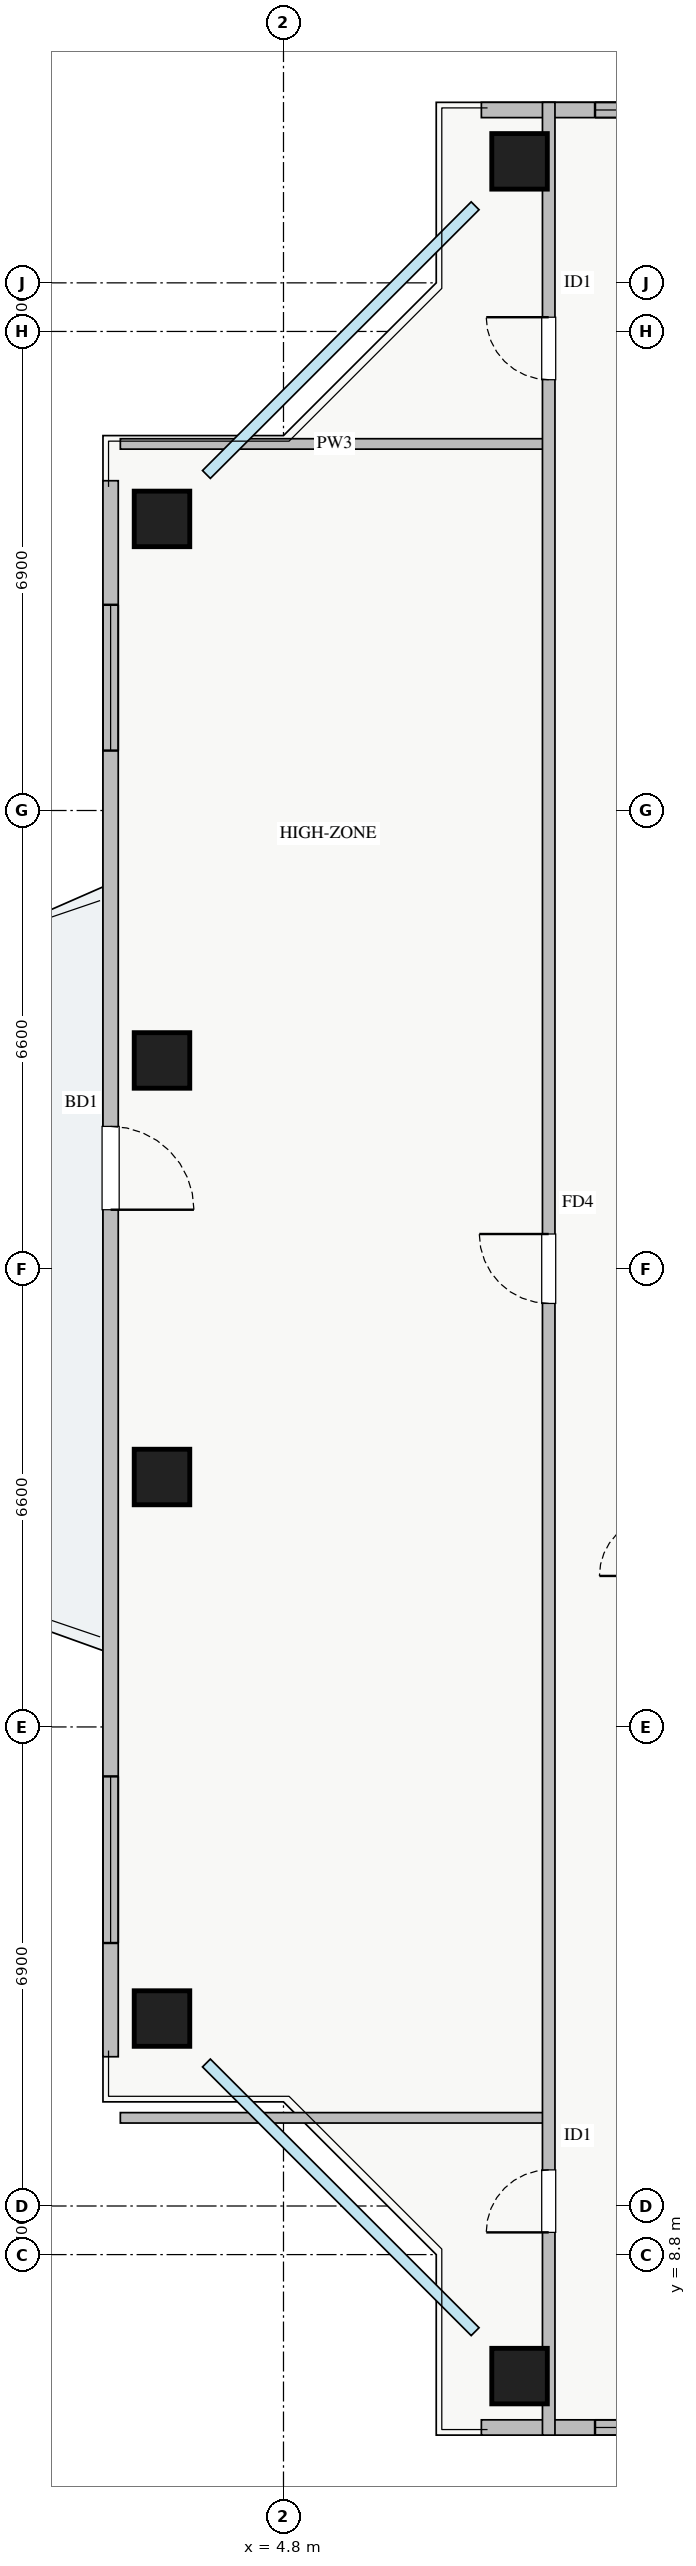
"""IFC4 building model, lengths in metres.
Left out: names, types, materials, properties, quantities, classifications, styles, units other than length and angle.
Written with IfcOpenShell. Run it as: python <this file> out.ifc"""

import sys

from ifc_helpers import new_model, si_unit, direction, frame, frame_2d, origin, origin_2d, place, context, subcontext, project, spatial, rectangle, extrude, source, transform, mapped, element, fill, save


model = new_model("IFC4")
c1 = context("Model", 3, precision=1e-05, world=origin(), true_north=direction((0.0, 1.0)))
c2 = subcontext(c1, "Body", "Model", "MODEL_VIEW")
j1 = project(units=[si_unit("LENGTHUNIT", "METRE"), si_unit("PLANEANGLEUNIT", "RADIAN")], contexts=[c1])
p1 = place(None, origin())
s1 = spatial("IfcSite", under=j1, at=p1, CompositionType="ELEMENT")
p2 = place(p1, origin())
s2 = spatial("IfcBuilding", under=s1, at=p2, CompositionType="ELEMENT")
p3 = place(p2, frame((0.0, 0.0, 229.5)))
s3 = spatial("IfcBuildingStorey", under=s2, at=p3, CompositionType="ELEMENT", Elevation=229.5)
m1 = source(origin(), c2, "Body", "SweptSolid", [
    extrude(rectangle(XDim=0.8, YDim=0.8, at=origin_2d()), origin(), (0.0, 0.0, 1.0), 3.25),
])
for number, where, z_axis, x_axis in (
    (1, (8.2, 7.05, 0.0), (0.0, 0.0, 1.0), (1.0, 0.0, 0.0)),
    (2, (8.2, 38.95, 0.0), (0.0, 0.0, 1.0), (1.0, 0.0, 0.0)),
    (3, (3.05, 33.8, 0.0), (0.0, 0.0, 1.0), (1.0, 0.0, 0.0)),
    (4, (3.05, 26.0, 0.0), (0.0, 0.0, 1.0), (1.0, 0.0, 0.0)),
    (5, (3.05, 20.0, 0.0), (0.0, 0.0, 1.0), (1.0, 0.0, 0.0)),
    (6, (3.05, 12.2, 0.0), (0.0, 0.0, 1.0), (1.0, 0.0, 0.0)),
):
    element("IfcColumn", number, at=place(p3, frame(where, z_axis=z_axis, x_axis=x_axis)), inside=s3, PredefinedType="COLUMN", context=c2, shape_type="MappedRepresentation", body=[
        mapped(m1, transform((0.0, 0.0, 0.0), x_axis=(1.0, 0.0, 0.0), y_axis=(0.0, 1.0, 0.0), z_axis=(0.0, 0.0, 1.0), scale=1.0)),
    ])
p4 = place(p3, frame((7.65, 6.31, 0.0), z_axis=(0.0, 0.0, 1.0), x_axis=(1.0, 0.0, 0.0)))
e7 = element("IfcWall", 7, at=p4, inside=s3, PredefinedType="STANDARD", context=c2, shape_type="SweptSolid", body=[
    extrude(rectangle(XDim=22.7, YDim=0.22, at=frame_2d((11.35, 0.0))), origin(), (0.0, 0.0, 1.0), 2.57),
])
p5 = place(p4, frame((12.2, 0.0, 0.0)))
e8 = element("IfcOpeningElement", 8, at=p5, cuts=e7, PredefinedType="OPENING", context=c2, shape_type="SweptSolid", body=[
    extrude(rectangle(XDim=1.2, YDim=2.1, at=frame_2d((0.6, 1.05))), frame((0.0, 0.12, 0.0), z_axis=(0.0, -1.0, 0.0), x_axis=(1.0, 0.0, 0.0)), (0.0, 0.0, 1.0), 0.24),
])
p6 = place(p4, frame((1.637, 0.0, 0.9)))
e9 = element("IfcOpeningElement", 9, at=p6, cuts=e7, PredefinedType="OPENING", context=c2, shape_type="SweptSolid", body=[
    extrude(rectangle(XDim=2.4, YDim=1.48, at=frame_2d((1.2, 0.74))), frame((0.0, 0.12, 0.0), z_axis=(0.0, -1.0, 0.0), x_axis=(1.0, 0.0, 0.0)), (0.0, 0.0, 1.0), 0.24),
])
p7 = place(p4, frame((7.612, 0.0, 0.9)))
e10 = element("IfcOpeningElement", 10, at=p7, cuts=e7, PredefinedType="OPENING", context=c2, shape_type="SweptSolid", body=[
    extrude(rectangle(XDim=1.8, YDim=1.45, at=frame_2d((0.9, 0.725))), frame((0.0, 0.12, 0.0), z_axis=(0.0, -1.0, 0.0), x_axis=(1.0, 0.0, 0.0)), (0.0, 0.0, 1.0), 0.24),
])
p8 = place(p4, frame((20.238, 0.0, 0.9)))
e11 = element("IfcOpeningElement", 11, at=p8, cuts=e7, PredefinedType="OPENING", context=c2, shape_type="SweptSolid", body=[
    extrude(rectangle(XDim=2.1, YDim=1.5, at=frame_2d((1.05, 0.75))), frame((0.0, 0.12, 0.0), z_axis=(0.0, -1.0, 0.0), x_axis=(1.0, 0.0, 0.0)), (0.0, 0.0, 1.0), 0.24),
])
p9 = place(p4, frame((17.02, 0.0, 0.9)))
e12 = element("IfcOpeningElement", 12, at=p9, cuts=e7, PredefinedType="OPENING", context=c2, shape_type="SweptSolid", body=[
    extrude(rectangle(XDim=2.4, YDim=1.5, at=frame_2d((1.2, 0.75))), frame((0.0, 0.12, 0.0), z_axis=(0.0, -1.0, 0.0), x_axis=(1.0, 0.0, 0.0)), (0.0, 0.0, 1.0), 0.24),
])
p10 = place(p3, frame((7.65, 39.69, 0.0), z_axis=(0.0, 0.0, 1.0), x_axis=(1.0, 0.0, 0.0)))
e13 = element("IfcWall", 13, at=p10, inside=s3, PredefinedType="STANDARD", context=c2, shape_type="SweptSolid", body=[
    extrude(rectangle(XDim=22.7, YDim=0.22, at=frame_2d((11.35, 0.0))), origin(), (0.0, 0.0, 1.0), 2.57),
])
p11 = place(p10, frame((12.2, 0.0, 0.0)))
e14 = element("IfcOpeningElement", 14, at=p11, cuts=e13, PredefinedType="OPENING", context=c2, shape_type="SweptSolid", body=[
    extrude(rectangle(XDim=1.2, YDim=2.1, at=frame_2d((0.6, 1.05))), frame((0.0, 0.12, 0.0), z_axis=(0.0, -1.0, 0.0), x_axis=(1.0, 0.0, 0.0)), (0.0, 0.0, 1.0), 0.24),
])
p12 = place(p10, frame((1.637, 0.0, 0.9)))
e15 = element("IfcOpeningElement", 15, at=p12, cuts=e13, PredefinedType="OPENING", context=c2, shape_type="SweptSolid", body=[
    extrude(rectangle(XDim=2.4, YDim=1.48, at=frame_2d((1.2, 0.74))), frame((0.0, 0.12, 0.0), z_axis=(0.0, -1.0, 0.0), x_axis=(1.0, 0.0, 0.0)), (0.0, 0.0, 1.0), 0.24),
])
p13 = place(p10, frame((7.612, 0.0, 0.9)))
e16 = element("IfcOpeningElement", 16, at=p13, cuts=e13, PredefinedType="OPENING", context=c2, shape_type="SweptSolid", body=[
    extrude(rectangle(XDim=1.8, YDim=1.45, at=frame_2d((0.9, 0.725))), frame((0.0, 0.12, 0.0), z_axis=(0.0, -1.0, 0.0), x_axis=(1.0, 0.0, 0.0)), (0.0, 0.0, 1.0), 0.24),
])
p14 = place(p10, frame((18.812, 0.0, 0.9)))
e17 = element("IfcOpeningElement", 17, at=p14, cuts=e13, PredefinedType="OPENING", context=c2, shape_type="SweptSolid", body=[
    extrude(rectangle(XDim=2.1, YDim=1.48, at=frame_2d((1.05, 0.74))), frame((0.0, 0.12, 0.0), z_axis=(0.0, -1.0, 0.0), x_axis=(1.0, 0.0, 0.0)), (0.0, 0.0, 1.0), 0.24),
])
p15 = place(p3, frame((2.31, 11.65, 0.0), z_axis=(0.0, 0.0, 1.0), x_axis=(0.0, 1.0, 0.0)))
e18 = element("IfcWall", 18, at=p15, inside=s3, PredefinedType="STANDARD", context=c2, shape_type="SweptSolid", body=[
    extrude(rectangle(XDim=22.7, YDim=0.22, at=frame_2d((11.35, 0.0))), origin(), (0.0, 0.0, 1.0), 2.57),
])
p16 = place(p15, frame((12.2, 0.0, 0.0)))
e19 = element("IfcOpeningElement", 19, at=p16, cuts=e18, PredefinedType="OPENING", context=c2, shape_type="SweptSolid", body=[
    extrude(rectangle(XDim=1.2, YDim=2.1, at=frame_2d((0.6, 1.05))), frame((0.0, 0.12, 0.0), z_axis=(0.0, -1.0, 0.0), x_axis=(1.0, 0.0, 0.0)), (0.0, 0.0, 1.0), 0.24),
])
p17 = place(p15, frame((1.638, 0.0, 0.9)))
e20 = element("IfcOpeningElement", 20, at=p17, cuts=e18, PredefinedType="OPENING", context=c2, shape_type="SweptSolid", body=[
    extrude(rectangle(XDim=2.4, YDim=1.48, at=frame_2d((1.2, 0.74))), frame((0.0, 0.12, 0.0), z_axis=(0.0, -1.0, 0.0), x_axis=(1.0, 0.0, 0.0)), (0.0, 0.0, 1.0), 0.24),
])
p18 = place(p15, frame((18.813, 0.0, 0.9)))
e21 = element("IfcOpeningElement", 21, at=p18, cuts=e18, PredefinedType="OPENING", context=c2, shape_type="SweptSolid", body=[
    extrude(rectangle(XDim=2.1, YDim=1.48, at=frame_2d((1.05, 0.74))), frame((0.0, 0.12, 0.0), z_axis=(0.0, -1.0, 0.0), x_axis=(1.0, 0.0, 0.0)), (0.0, 0.0, 1.0), 0.24),
])
for number, where, z_axis, x_axis in (
    (22, (2.45, 34.88, 0.0), (0.0, 0.0, 1.0), (1.0, 0.0, 0.0)),
    (23, (2.45, 10.77, 0.0), (0.0, 0.0, 1.0), (1.0, 0.0, 0.0)),
):
    element("IfcWall", number, at=place(p3, frame(where, z_axis=z_axis, x_axis=x_axis)), inside=s3, PredefinedType="PARTITIONING", context=c2, shape_type="SweptSolid", body=[
        extrude(rectangle(XDim=6.17, YDim=0.15, at=frame_2d((3.085, 0.0))), origin(), (0.0, 0.0, 1.0), 3.03),
    ])
p19 = place(p3, frame((8.62, 6.2, 0.0), z_axis=(0.0, 0.0, 1.0), x_axis=(0.0, 1.0, 0.0)))
e24 = element("IfcWall", 24, at=p19, inside=s3, PredefinedType="PARTITIONING", context=c2, shape_type="SweptSolid", body=[
    extrude(rectangle(XDim=33.6, YDim=0.18, at=frame_2d((16.8, 0.0))), origin(), (0.0, 0.0, 1.0), 3.03),
])
p20 = place(p19, frame((29.605, 0.0, 0.0)))
e25 = element("IfcOpeningElement", 25, at=p20, cuts=e24, PredefinedType="OPENING", context=c2, shape_type="SweptSolid", body=[
    extrude(rectangle(XDim=0.9, YDim=2.05, at=frame_2d((0.45, 1.025))), frame((0.0, 0.1, 0.0), z_axis=(0.0, -1.0, 0.0), x_axis=(1.0, 0.0, 0.0)), (0.0, 0.0, 1.0), 0.2),
])
p21 = place(p19, frame((2.92, 0.0, 0.0)))
e26 = element("IfcOpeningElement", 26, at=p21, cuts=e24, PredefinedType="OPENING", context=c2, shape_type="SweptSolid", body=[
    extrude(rectangle(XDim=0.9, YDim=2.05, at=frame_2d((0.45, 1.025))), frame((0.0, 0.1, 0.0), z_axis=(0.0, -1.0, 0.0), x_axis=(1.0, 0.0, 0.0)), (0.0, 0.0, 1.0), 0.2),
])
p22 = place(p19, frame((16.3, 0.0, 0.0)))
e27 = element("IfcOpeningElement", 27, at=p22, cuts=e24, PredefinedType="OPENING", context=c2, shape_type="SweptSolid", body=[
    extrude(rectangle(XDim=1.0, YDim=2.05, at=frame_2d((0.5, 1.025))), frame((0.0, 0.1, 0.0), z_axis=(0.0, -1.0, 0.0), x_axis=(1.0, 0.0, 0.0)), (0.0, 0.0, 1.0), 0.2),
])
m2 = source(origin(), c2, "Body", "SweptSolid", [
    extrude(rectangle(XDim=2.4, YDim=1.48, at=frame_2d((1.2, 0.74))), frame((0.0, 0.03, 0.0), z_axis=(0.0, -1.0, 0.0), x_axis=(1.0, 0.0, 0.0)), (0.0, 0.0, 1.0), 0.06),
])
p23 = place(p6, origin())
e28 = element("IfcWindow", 28, at=p23, inside=s3, PartitioningType="TRIPLE_PANEL_VERTICAL", PredefinedType="WINDOW", context=c2, shape_type="MappedRepresentation", body=[
    mapped(m2, transform((0.0, 0.0, 0.0), x_axis=(1.0, 0.0, 0.0), y_axis=(0.0, 1.0, 0.0), z_axis=(0.0, 0.0, 1.0), scale=1.0)),
])
fill(e9, e28)
p24 = place(p12, origin())
e29 = element("IfcWindow", 29, at=p24, inside=s3, PartitioningType="TRIPLE_PANEL_VERTICAL", PredefinedType="WINDOW", context=c2, shape_type="MappedRepresentation", body=[
    mapped(m2, transform((0.0, 0.0, 0.0), x_axis=(1.0, 0.0, 0.0), y_axis=(0.0, 1.0, 0.0), z_axis=(0.0, 0.0, 1.0), scale=1.0)),
])
fill(e15, e29)
m3 = source(origin(), c2, "Body", "SweptSolid", [
    extrude(rectangle(XDim=1.2, YDim=2.1, at=frame_2d((0.6, 1.05))), frame((0.0, 0.025, 0.0), z_axis=(0.0, -1.0, 0.0), x_axis=(1.0, 0.0, 0.0)), (0.0, 0.0, 1.0), 0.05),
])
p25 = place(p16, frame((1.2, 0.0, 0.0), z_axis=(0.0, 0.0, 1.0), x_axis=(-1.0, 0.0, 0.0)))
e30 = element("IfcDoor", 30, at=p25, inside=s3, OperationType="SINGLE_SWING_LEFT", PredefinedType="DOOR", context=c2, shape_type="MappedRepresentation", body=[
    mapped(m3, transform((0.0, 0.0, 0.0), x_axis=(1.0, 0.0, 0.0), y_axis=(0.0, 1.0, 0.0), z_axis=(0.0, 0.0, 1.0), scale=1.0)),
])
fill(e19, e30)
p26 = place(p17, origin())
e31 = element("IfcWindow", 31, at=p26, inside=s3, PartitioningType="TRIPLE_PANEL_VERTICAL", PredefinedType="WINDOW", context=c2, shape_type="MappedRepresentation", body=[
    mapped(m2, transform((0.0, 0.0, 0.0), x_axis=(1.0, 0.0, 0.0), y_axis=(0.0, 1.0, 0.0), z_axis=(0.0, 0.0, 1.0), scale=1.0)),
])
fill(e20, e31)
m4 = source(origin(), c2, "Body", "SweptSolid", [
    extrude(rectangle(XDim=2.1, YDim=1.48, at=frame_2d((1.05, 0.74))), frame((0.0, 0.03, 0.0), z_axis=(0.0, -1.0, 0.0), x_axis=(1.0, 0.0, 0.0)), (0.0, 0.0, 1.0), 0.06),
])
p27 = place(p18, origin())
e32 = element("IfcWindow", 32, at=p27, inside=s3, PartitioningType="TRIPLE_PANEL_VERTICAL", PredefinedType="WINDOW", context=c2, shape_type="MappedRepresentation", body=[
    mapped(m4, transform((0.0, 0.0, 0.0), x_axis=(1.0, 0.0, 0.0), y_axis=(0.0, 1.0, 0.0), z_axis=(0.0, 0.0, 1.0), scale=1.0)),
])
fill(e21, e32)
m5 = source(origin(), c2, "Body", "SweptSolid", [
    extrude(rectangle(XDim=0.9, YDim=2.05, at=frame_2d((0.45, 1.025))), frame((0.0, 0.025, 0.0), z_axis=(0.0, -1.0, 0.0), x_axis=(1.0, 0.0, 0.0)), (0.0, 0.0, 1.0), 0.05),
])
p28 = place(p20, origin())
e33 = element("IfcDoor", 33, at=p28, inside=s3, OperationType="SINGLE_SWING_RIGHT", PredefinedType="DOOR", context=c2, shape_type="MappedRepresentation", body=[
    mapped(m5, transform((0.0, 0.0, 0.0), x_axis=(1.0, 0.0, 0.0), y_axis=(0.0, 1.0, 0.0), z_axis=(0.0, 0.0, 1.0), scale=1.0)),
])
fill(e25, e33)
p29 = place(p21, origin())
e34 = element("IfcDoor", 34, at=p29, inside=s3, OperationType="SINGLE_SWING_LEFT", PredefinedType="DOOR", context=c2, shape_type="MappedRepresentation", body=[
    mapped(m5, transform((0.0, 0.0, 0.0), x_axis=(1.0, 0.0, 0.0), y_axis=(0.0, 1.0, 0.0), z_axis=(0.0, 0.0, 1.0), scale=1.0)),
])
fill(e26, e34)
m6 = source(origin(), c2, "Body", "SweptSolid", [
    extrude(rectangle(XDim=1.0, YDim=2.05, at=frame_2d((0.5, 1.025))), frame((0.0, 0.025, 0.0), z_axis=(0.0, -1.0, 0.0), x_axis=(1.0, 0.0, 0.0)), (0.0, 0.0, 1.0), 0.05),
])
p30 = place(p22, origin())
e35 = element("IfcDoor", 35, at=p30, inside=s3, OperationType="SINGLE_SWING_RIGHT", PredefinedType="DOOR", context=c2, shape_type="MappedRepresentation", body=[
    mapped(m6, transform((0.0, 0.0, 0.0), x_axis=(1.0, 0.0, 0.0), y_axis=(0.0, 1.0, 0.0), z_axis=(0.0, 0.0, 1.0), scale=1.0)),
])
fill(e27, e35)
save(model, sys.argv[1])
